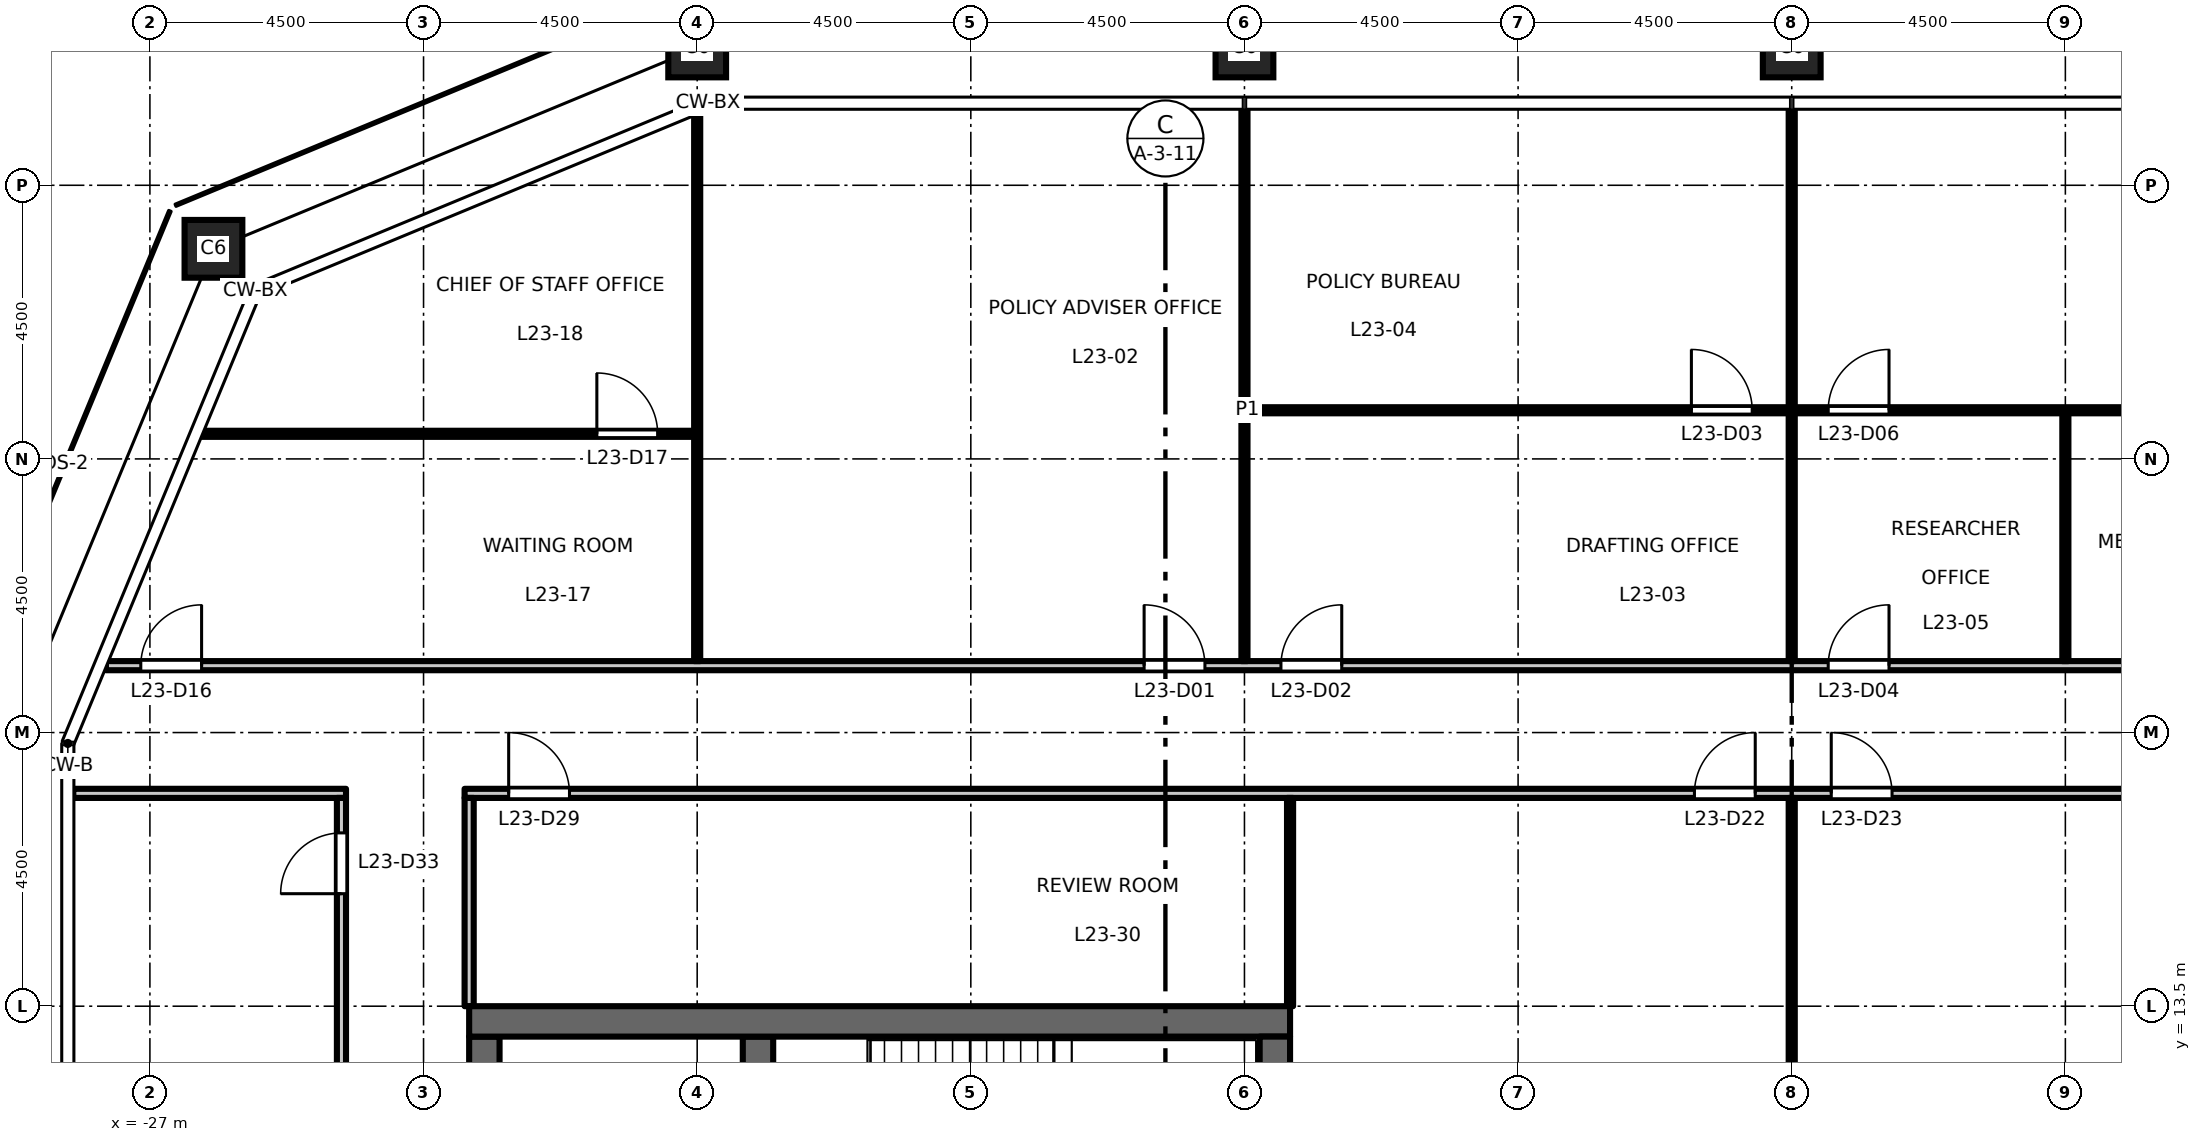
"""IFC4 building model, lengths in metres.
Left out: names, types, materials, properties, quantities, classifications, styles, units other than length and angle.
Written with IfcOpenShell. Run it as: python <this file> out.ifc"""

import sys

from ifc_helpers import new_model, si_unit, direction, frame, frame_2d, origin, origin_2d, place, context, subcontext, project, spatial, rectangle, hollow_rectangle, extrude, element, fill, save


model = new_model("IFC4")
c1 = context("Model", 3, precision=1e-05, world=origin(), true_north=direction((0.0, 1.0)))
c2 = subcontext(c1, "Body", "Model", "MODEL_VIEW")
j1 = project(units=[si_unit("LENGTHUNIT", "METRE"), si_unit("PLANEANGLEUNIT", "RADIAN")], contexts=[c1])
p1 = place(None, origin())
s1 = spatial("IfcSite", under=j1, at=p1, CompositionType="ELEMENT")
p2 = place(p1, origin())
s2 = spatial("IfcBuilding", under=s1, at=p2, CompositionType="ELEMENT")
p3 = place(p2, frame((0.0, 0.0, 109.2)))
s3 = spatial("IfcBuildingStorey", under=s2, at=p3, CompositionType="ELEMENT", Elevation=109.2)
for number, where, z_axis, x_axis in (
    (1, (0.0, 29.25, 0.0), (0.0, 0.0, 1.0), (1.0, 0.0, 0.0)),
    (2, (-9.0, 29.25, 0.0), (0.0, 0.0, 1.0), (1.0, 0.0, 0.0)),
    (3, (-18.0, 29.25, 0.0), (0.0, 0.0, 1.0), (1.0, 0.0, 0.0)),
    (4, (-25.955, 25.955, 0.0), (0.0, 0.0, 1.0), (1.0, 0.0, 0.0)),
):
    element("IfcColumn", number, at=place(p3, frame(where, z_axis=z_axis, x_axis=x_axis)), inside=s3, PredefinedType="COLUMN", context=c2, shape_type="SweptSolid", body=[
        extrude(hollow_rectangle(XDim=0.95, YDim=0.95, WallThickness=0.055, at=origin_2d()), origin(), (0.0, 0.0, 1.0), 4.5),
    ])
p4 = place(p3, frame((-21.5, -13.0, 0.0), z_axis=(0.0, 0.0, 1.0), x_axis=(0.0, 1.0, 0.0)))
e5 = element("IfcWall", 5, at=p4, inside=s3, PredefinedType="SHEAR", context=c2, shape_type="SweptSolid", body=[
    extrude(rectangle(XDim=26.0, YDim=0.5, at=frame_2d((13.0, 0.0))), origin(), (0.0, 0.0, 1.0), 4.35),
])
p5 = place(p4, frame((16.825, 0.0, 0.0)))
e6 = element("IfcOpeningElement", 6, at=p5, cuts=e5, PredefinedType="OPENING", context=c2, shape_type="SweptSolid", body=[
    extrude(rectangle(XDim=1.8, YDim=2.1, at=frame_2d((0.9, 1.05))), frame((0.0, 0.26, 0.0), z_axis=(0.0, -1.0, 0.0), x_axis=(1.0, 0.0, 0.0)), (0.0, 0.0, 1.0), 0.52),
])
p6 = place(p4, frame((7.375, 0.0, 0.0)))
e7 = element("IfcOpeningElement", 7, at=p6, cuts=e5, PredefinedType="OPENING", context=c2, shape_type="SweptSolid", body=[
    extrude(rectangle(XDim=1.8, YDim=2.1, at=frame_2d((0.9, 1.05))), frame((0.0, 0.26, 0.0), z_axis=(0.0, -1.0, 0.0), x_axis=(1.0, 0.0, 0.0)), (0.0, 0.0, 1.0), 0.52),
])
p7 = place(p4, frame((22.45, 0.0, 0.0)))
e8 = element("IfcOpeningElement", 8, at=p7, cuts=e5, PredefinedType="OPENING", context=c2, shape_type="SweptSolid", body=[
    extrude(rectangle(XDim=0.9, YDim=2.1, at=frame_2d((0.45, 1.05))), frame((0.0, 0.26, 0.0), z_axis=(0.0, -1.0, 0.0), x_axis=(1.0, 0.0, 0.0)), (0.0, 0.0, 1.0), 0.52),
])
p8 = place(p4, frame((1.7, 0.0, 0.0)))
e9 = element("IfcOpeningElement", 9, at=p8, cuts=e5, PredefinedType="OPENING", context=c2, shape_type="SweptSolid", body=[
    extrude(rectangle(XDim=0.9, YDim=2.1, at=frame_2d((0.45, 1.05))), frame((0.0, 0.26, 0.0), z_axis=(0.0, -1.0, 0.0), x_axis=(1.0, 0.0, 0.0)), (0.0, 0.0, 1.0), 0.52),
])
p9 = place(p3, frame((-17.0, 6.425, 0.0), z_axis=(0.0, 0.0, 1.0), x_axis=(0.0, 1.0, 0.0)))
e10 = element("IfcWall", 10, at=p9, inside=s3, PredefinedType="SHEAR", context=c2, shape_type="SweptSolid", body=[
    extrude(rectangle(XDim=6.575, YDim=0.5, at=frame_2d((3.288, 0.0))), origin(), (0.0, 0.0, 1.0), 4.35),
])
p10 = place(p3, frame((-8.25, 13.25, 0.0), z_axis=(0.0, 0.0, 1.0), x_axis=(-1.0, 0.0, 0.0)))
e11 = element("IfcWall", 11, at=p10, inside=s3, PredefinedType="SHEAR", context=c2, shape_type="SweptSolid", body=[
    extrude(rectangle(XDim=13.5, YDim=0.5, at=frame_2d((6.75, 0.0))), origin(), (0.0, 0.0, 1.0), 4.35),
])
p11 = place(p3, frame((-8.5, -13.0, 0.0), z_axis=(0.0, 0.0, 1.0), x_axis=(0.0, 1.0, 0.0)))
e12 = element("IfcWall", 12, at=p11, inside=s3, PredefinedType="SHEAR", context=c2, shape_type="SweptSolid", body=[
    extrude(rectangle(XDim=26.0, YDim=0.5, at=frame_2d((13.0, 0.0))), origin(), (0.0, 0.0, 1.0), 4.35),
])
p12 = place(p3, frame((-28.26, 17.0, 0.0), z_axis=(0.0, 0.0, 1.0), x_axis=(1.0, 0.0, 0.0)))
e13 = element("IfcWall", 13, at=p12, inside=s3, PredefinedType="PARTITIONING", context=c2, shape_type="SweptSolid", body=[
    extrude(rectangle(XDim=4.485, YDim=0.15, at=frame_2d((2.243, 0.0))), origin(), (0.0, 0.0, 1.0), 4.35),
])
p13 = place(p3, frame((-21.825, 17.0, 0.0), z_axis=(0.0, 0.0, 1.0), x_axis=(1.0, 0.0, 0.0)))
e14 = element("IfcWall", 14, at=p13, inside=s3, PredefinedType="PARTITIONING", context=c2, shape_type="SweptSolid", body=[
    extrude(rectangle(XDim=43.65, YDim=0.15, at=frame_2d((21.825, 0.0))), origin(), (0.0, 0.0, 1.0), 4.35),
])
p14 = place(p13, frame((20.225, 0.0, 0.0)))
e15 = element("IfcOpeningElement", 15, at=p14, cuts=e14, PredefinedType="OPENING", context=c2, shape_type="SweptSolid", body=[
    extrude(rectangle(XDim=1.0, YDim=2.1, at=frame_2d((0.5, 1.05))), frame((0.0, 0.085, 0.0), z_axis=(0.0, -1.0, 0.0), x_axis=(1.0, 0.0, 0.0)), (0.0, 0.0, 1.0), 0.17),
])
p15 = place(p13, frame((22.475, 0.0, 0.0)))
e16 = element("IfcOpeningElement", 16, at=p15, cuts=e14, PredefinedType="OPENING", context=c2, shape_type="SweptSolid", body=[
    extrude(rectangle(XDim=1.0, YDim=2.1, at=frame_2d((0.5, 1.05))), frame((0.0, 0.085, 0.0), z_axis=(0.0, -1.0, 0.0), x_axis=(1.0, 0.0, 0.0)), (0.0, 0.0, 1.0), 0.17),
])
p16 = place(p13, frame((0.725, 0.0, 0.0)))
e17 = element("IfcOpeningElement", 17, at=p16, cuts=e14, PredefinedType="OPENING", context=c2, shape_type="SweptSolid", body=[
    extrude(rectangle(XDim=1.0, YDim=2.1, at=frame_2d((0.5, 1.05))), frame((0.0, 0.085, 0.0), z_axis=(0.0, -1.0, 0.0), x_axis=(1.0, 0.0, 0.0)), (0.0, 0.0, 1.0), 0.17),
])
p17 = place(p13, frame((41.975, 0.0, 0.0)))
e18 = element("IfcOpeningElement", 18, at=p17, cuts=e14, PredefinedType="OPENING", context=c2, shape_type="SweptSolid", body=[
    extrude(rectangle(XDim=1.0, YDim=2.1, at=frame_2d((0.5, 1.05))), frame((0.0, 0.085, 0.0), z_axis=(0.0, -1.0, 0.0), x_axis=(1.0, 0.0, 0.0)), (0.0, 0.0, 1.0), 0.17),
])
p18 = place(p3, frame((-27.723, 19.1, 0.0), z_axis=(0.0, 0.0, 1.0), x_axis=(1.0, 0.0, 0.0)))
e19 = element("IfcWall", 19, at=p18, inside=s3, PredefinedType="PARTITIONING", context=c2, shape_type="SweptSolid", body=[
    extrude(rectangle(XDim=55.446, YDim=0.15, at=frame_2d((27.723, 0.0))), origin(), (0.0, 0.0, 1.0), 4.35),
])
p19 = place(p18, frame((17.073, 0.0, 0.0)))
e20 = element("IfcOpeningElement", 20, at=p19, cuts=e19, PredefinedType="OPENING", context=c2, shape_type="SweptSolid", body=[
    extrude(rectangle(XDim=1.0, YDim=2.1, at=frame_2d((0.5, 1.05))), frame((0.0, 0.085, 0.0), z_axis=(0.0, -1.0, 0.0), x_axis=(1.0, 0.0, 0.0)), (0.0, 0.0, 1.0), 0.17),
])
p20 = place(p18, frame((19.323, 0.0, 0.0)))
e21 = element("IfcOpeningElement", 21, at=p20, cuts=e19, PredefinedType="OPENING", context=c2, shape_type="SweptSolid", body=[
    extrude(rectangle(XDim=1.0, YDim=2.1, at=frame_2d((0.5, 1.05))), frame((0.0, 0.085, 0.0), z_axis=(0.0, -1.0, 0.0), x_axis=(1.0, 0.0, 0.0)), (0.0, 0.0, 1.0), 0.17),
])
p21 = place(p18, frame((28.323, 0.0, 0.0)))
e22 = element("IfcOpeningElement", 22, at=p21, cuts=e19, PredefinedType="OPENING", context=c2, shape_type="SweptSolid", body=[
    extrude(rectangle(XDim=1.0, YDim=2.1, at=frame_2d((0.5, 1.05))), frame((0.0, 0.085, 0.0), z_axis=(0.0, -1.0, 0.0), x_axis=(1.0, 0.0, 0.0)), (0.0, 0.0, 1.0), 0.17),
])
p22 = place(p18, frame((35.073, 0.0, 0.0)))
e23 = element("IfcOpeningElement", 23, at=p22, cuts=e19, PredefinedType="OPENING", context=c2, shape_type="SweptSolid", body=[
    extrude(rectangle(XDim=1.0, YDim=2.1, at=frame_2d((0.5, 1.05))), frame((0.0, 0.085, 0.0), z_axis=(0.0, -1.0, 0.0), x_axis=(1.0, 0.0, 0.0)), (0.0, 0.0, 1.0), 0.17),
])
p23 = place(p18, frame((44.073, 0.0, 0.0)))
e24 = element("IfcOpeningElement", 24, at=p23, cuts=e19, PredefinedType="OPENING", context=c2, shape_type="SweptSolid", body=[
    extrude(rectangle(XDim=1.0, YDim=2.1, at=frame_2d((0.5, 1.05))), frame((0.0, 0.085, 0.0), z_axis=(0.0, -1.0, 0.0), x_axis=(1.0, 0.0, 0.0)), (0.0, 0.0, 1.0), 0.17),
])
p24 = place(p18, frame((0.573, 0.0, 0.0)))
e25 = element("IfcOpeningElement", 25, at=p24, cuts=e19, PredefinedType="OPENING", context=c2, shape_type="SweptSolid", body=[
    extrude(rectangle(XDim=1.0, YDim=2.1, at=frame_2d((0.5, 1.05))), frame((0.0, 0.085, 0.0), z_axis=(0.0, -1.0, 0.0), x_axis=(1.0, 0.0, 0.0)), (0.0, 0.0, 1.0), 0.17),
])
p25 = place(p18, frame((46.296, 0.0, 0.0)))
e26 = element("IfcOpeningElement", 26, at=p25, cuts=e19, PredefinedType="OPENING", context=c2, shape_type="SweptSolid", body=[
    extrude(rectangle(XDim=1.0, YDim=2.1, at=frame_2d((0.5, 1.05))), frame((0.0, 0.085, 0.0), z_axis=(0.0, -1.0, 0.0), x_axis=(1.0, 0.0, 0.0)), (0.0, 0.0, 1.0), 0.17),
])
p26 = place(p3, frame((-26.143, 22.913, 0.0), z_axis=(0.0, 0.0, 1.0), x_axis=(1.0, 0.0, 0.0)))
e27 = element("IfcWall", 27, at=p26, inside=s3, PredefinedType="PARTITIONING", context=c2, shape_type="SweptSolid", body=[
    extrude(rectangle(XDim=8.093, YDim=0.1, at=frame_2d((4.046, 0.0))), origin(), (0.0, 0.0, 1.0), 4.35),
])
p27 = place(p26, frame((6.493, 0.0, 0.0)))
e28 = element("IfcOpeningElement", 28, at=p27, cuts=e27, PredefinedType="OPENING", context=c2, shape_type="SweptSolid", body=[
    extrude(rectangle(XDim=1.0, YDim=2.1, at=frame_2d((0.5, 1.05))), frame((0.0, 0.06, 0.0), z_axis=(0.0, -1.0, 0.0), x_axis=(1.0, 0.0, 0.0)), (0.0, 0.0, 1.0), 0.12),
])
p28 = place(p3, frame((-8.95, 23.3, 0.0), z_axis=(0.0, 0.0, 1.0), x_axis=(1.0, 0.0, 0.0)))
e29 = element("IfcWall", 29, at=p28, inside=s3, PredefinedType="PARTITIONING", context=c2, shape_type="SweptSolid", body=[
    extrude(rectangle(XDim=17.9, YDim=0.1, at=frame_2d((8.95, 0.0))), origin(), (0.0, 0.0, 1.0), 4.35),
])
p29 = place(p28, frame((7.3, 0.0, 0.0)))
e30 = element("IfcOpeningElement", 30, at=p29, cuts=e29, PredefinedType="OPENING", context=c2, shape_type="SweptSolid", body=[
    extrude(rectangle(XDim=1.0, YDim=2.1, at=frame_2d((0.5, 1.05))), frame((0.0, 0.06, 0.0), z_axis=(0.0, -1.0, 0.0), x_axis=(1.0, 0.0, 0.0)), (0.0, 0.0, 1.0), 0.12),
])
p30 = place(p28, frame((9.55, 0.0, 0.0)))
e31 = element("IfcOpeningElement", 31, at=p30, cuts=e29, PredefinedType="OPENING", context=c2, shape_type="SweptSolid", body=[
    extrude(rectangle(XDim=1.0, YDim=2.1, at=frame_2d((0.5, 1.05))), frame((0.0, 0.06, 0.0), z_axis=(0.0, -1.0, 0.0), x_axis=(1.0, 0.0, 0.0)), (0.0, 0.0, 1.0), 0.12),
])
p31 = place(p3, frame((-23.85, -16.925, 0.0), z_axis=(0.0, 0.0, 1.0), x_axis=(0.0, 1.0, 0.0)))
e32 = element("IfcWall", 32, at=p31, inside=s3, PredefinedType="PARTITIONING", context=c2, shape_type="SweptSolid", body=[
    extrude(rectangle(XDim=33.85, YDim=0.15, at=frame_2d((16.925, 0.0))), origin(), (0.0, 0.0, 1.0), 4.35),
])
p32 = place(p31, frame((32.275, 0.0, 0.0)))
e33 = element("IfcOpeningElement", 33, at=p32, cuts=e32, PredefinedType="OPENING", context=c2, shape_type="SweptSolid", body=[
    extrude(rectangle(XDim=1.0, YDim=2.1, at=frame_2d((0.5, 1.05))), frame((0.0, 0.085, 0.0), z_axis=(0.0, -1.0, 0.0), x_axis=(1.0, 0.0, 0.0)), (0.0, 0.0, 1.0), 0.17),
])
p33 = place(p3, frame((-21.75, 13.5, 0.0), z_axis=(0.0, 0.0, 1.0), x_axis=(0.0, 1.0, 0.0)))
e34 = element("IfcWall", 34, at=p33, inside=s3, PredefinedType="PARTITIONING", context=c2, shape_type="SweptSolid", body=[
    extrude(rectangle(XDim=3.425, YDim=0.15, at=frame_2d((1.712, 0.0))), origin(), (0.0, 0.0, 1.0), 4.35),
])
p34 = place(p3, frame((-18.0, 19.175, 0.0), z_axis=(0.0, 0.0, 1.0), x_axis=(0.0, 1.0, 0.0)))
e35 = element("IfcWall", 35, at=p34, inside=s3, PredefinedType="PARTITIONING", context=c2, shape_type="SweptSolid", body=[
    extrude(rectangle(XDim=9.003, YDim=0.1, at=frame_2d((4.501, 0.0))), origin(), (0.0, 0.0, 1.0), 3.45),
])
p35 = place(p3, frame((-9.0, 19.175, 0.0), z_axis=(0.0, 0.0, 1.0), x_axis=(0.0, 1.0, 0.0)))
e36 = element("IfcWall", 36, at=p35, inside=s3, PredefinedType="PARTITIONING", context=c2, shape_type="SweptSolid", body=[
    extrude(rectangle(XDim=9.085, YDim=0.1, at=frame_2d((4.542, 0.0))), origin(), (0.0, 0.0, 1.0), 3.45),
])
p36 = place(p3, frame((-8.25, 13.5, 0.0), z_axis=(0.0, 0.0, 1.0), x_axis=(0.0, 1.0, 0.0)))
e37 = element("IfcWall", 37, at=p36, inside=s3, PredefinedType="PARTITIONING", context=c2, shape_type="SweptSolid", body=[
    extrude(rectangle(XDim=3.425, YDim=0.1, at=frame_2d((1.712, 0.0))), origin(), (0.0, 0.0, 1.0), 4.35),
])
p37 = place(p3, frame((0.0, 8.65, 0.0), z_axis=(0.0, 0.0, 1.0), x_axis=(0.0, 1.0, 0.0)))
e38 = element("IfcWall", 38, at=p37, inside=s3, PredefinedType="PARTITIONING", context=c2, shape_type="SweptSolid", body=[
    extrude(rectangle(XDim=8.275, YDim=0.1, at=frame_2d((4.138, 0.0))), origin(), (0.0, 0.0, 1.0), 3.45),
])
p38 = place(p3, frame((0.0, 19.175, 0.0), z_axis=(0.0, 0.0, 1.0), x_axis=(0.0, 1.0, 0.0)))
e39 = element("IfcWall", 39, at=p38, inside=s3, PredefinedType="PARTITIONING", context=c2, shape_type="SweptSolid", body=[
    extrude(rectangle(XDim=4.075, YDim=0.1, at=frame_2d((2.038, 0.0))), origin(), (0.0, 0.0, 1.0), 3.45),
])
p39 = place(p3, frame((0.0, 23.35, 0.0), z_axis=(0.0, 0.0, 1.0), x_axis=(0.0, 1.0, 0.0)))
e40 = element("IfcWall", 40, at=p39, inside=s3, PredefinedType="PARTITIONING", context=c2, shape_type="SweptSolid", body=[
    extrude(rectangle(XDim=4.91, YDim=0.1, at=frame_2d((2.455, 0.0))), origin(), (0.0, 0.0, 1.0), 3.45),
])
p40 = place(p3, frame((4.5, 19.175, 0.0), z_axis=(0.0, 0.0, 1.0), x_axis=(0.0, 1.0, 0.0)))
e41 = element("IfcWall", 41, at=p40, inside=s3, PredefinedType="PARTITIONING", context=c2, shape_type="SweptSolid", body=[
    extrude(rectangle(XDim=4.075, YDim=0.1, at=frame_2d((2.038, 0.0))), origin(), (0.0, 0.0, 1.0), 4.35),
])
p41 = place(p19, origin())
e42 = element("IfcDoor", 42, at=p41, inside=s3, OperationType="SINGLE_SWING_LEFT", PredefinedType="DOOR", context=c2, shape_type="SweptSolid", body=[
    extrude(rectangle(XDim=1.0, YDim=2.1, at=frame_2d((0.5, 1.05))), frame((0.0, 0.025, 0.0), z_axis=(0.0, -1.0, 0.0), x_axis=(1.0, 0.0, 0.0)), (0.0, 0.0, 1.0), 0.05),
])
fill(e20, e42)
p42 = place(p20, origin())
e43 = element("IfcDoor", 43, at=p42, inside=s3, OperationType="SINGLE_SWING_RIGHT", PredefinedType="DOOR", context=c2, shape_type="SweptSolid", body=[
    extrude(rectangle(XDim=1.0, YDim=2.1, at=frame_2d((0.5, 1.05))), frame((0.0, 0.025, 0.0), z_axis=(0.0, -1.0, 0.0), x_axis=(1.0, 0.0, 0.0)), (0.0, 0.0, 1.0), 0.05),
])
fill(e21, e43)
p43 = place(p29, origin())
e44 = element("IfcDoor", 44, at=p43, inside=s3, OperationType="SINGLE_SWING_LEFT", PredefinedType="DOOR", context=c2, shape_type="SweptSolid", body=[
    extrude(rectangle(XDim=1.0, YDim=2.1, at=frame_2d((0.5, 1.05))), frame((0.0, 0.025, 0.0), z_axis=(0.0, -1.0, 0.0), x_axis=(1.0, 0.0, 0.0)), (0.0, 0.0, 1.0), 0.05),
])
fill(e30, e44)
p44 = place(p21, origin())
e45 = element("IfcDoor", 45, at=p44, inside=s3, OperationType="SINGLE_SWING_RIGHT", PredefinedType="DOOR", context=c2, shape_type="SweptSolid", body=[
    extrude(rectangle(XDim=1.0, YDim=2.1, at=frame_2d((0.5, 1.05))), frame((0.0, 0.025, 0.0), z_axis=(0.0, -1.0, 0.0), x_axis=(1.0, 0.0, 0.0)), (0.0, 0.0, 1.0), 0.05),
])
fill(e22, e45)
p45 = place(p30, origin())
e46 = element("IfcDoor", 46, at=p45, inside=s3, OperationType="SINGLE_SWING_RIGHT", PredefinedType="DOOR", context=c2, shape_type="SweptSolid", body=[
    extrude(rectangle(XDim=1.0, YDim=2.1, at=frame_2d((0.5, 1.05))), frame((0.0, 0.025, 0.0), z_axis=(0.0, -1.0, 0.0), x_axis=(1.0, 0.0, 0.0)), (0.0, 0.0, 1.0), 0.05),
])
fill(e31, e46)
p46 = place(p24, origin())
e47 = element("IfcDoor", 47, at=p46, inside=s3, OperationType="SINGLE_SWING_RIGHT", PredefinedType="DOOR", context=c2, shape_type="SweptSolid", body=[
    extrude(rectangle(XDim=1.0, YDim=2.1, at=frame_2d((0.5, 1.05))), frame((0.0, 0.025, 0.0), z_axis=(0.0, -1.0, 0.0), x_axis=(1.0, 0.0, 0.0)), (0.0, 0.0, 1.0), 0.05),
])
fill(e25, e47)
p47 = place(p27, origin())
e48 = element("IfcDoor", 48, at=p47, inside=s3, OperationType="SINGLE_SWING_LEFT", PredefinedType="DOOR", context=c2, shape_type="SweptSolid", body=[
    extrude(rectangle(XDim=1.0, YDim=2.1, at=frame_2d((0.5, 1.05))), frame((0.0, 0.025, 0.0), z_axis=(0.0, -1.0, 0.0), x_axis=(1.0, 0.0, 0.0)), (0.0, 0.0, 1.0), 0.05),
])
fill(e28, e48)
p48 = place(p14, origin())
e49 = element("IfcDoor", 49, at=p48, inside=s3, OperationType="SINGLE_SWING_RIGHT", PredefinedType="DOOR", context=c2, shape_type="SweptSolid", body=[
    extrude(rectangle(XDim=1.0, YDim=2.1, at=frame_2d((0.5, 1.05))), frame((0.0, 0.025, 0.0), z_axis=(0.0, -1.0, 0.0), x_axis=(1.0, 0.0, 0.0)), (0.0, 0.0, 1.0), 0.05),
])
fill(e15, e49)
p49 = place(p15, origin())
e50 = element("IfcDoor", 50, at=p49, inside=s3, OperationType="SINGLE_SWING_LEFT", PredefinedType="DOOR", context=c2, shape_type="SweptSolid", body=[
    extrude(rectangle(XDim=1.0, YDim=2.1, at=frame_2d((0.5, 1.05))), frame((0.0, 0.025, 0.0), z_axis=(0.0, -1.0, 0.0), x_axis=(1.0, 0.0, 0.0)), (0.0, 0.0, 1.0), 0.05),
])
fill(e16, e50)
p50 = place(p16, origin())
e51 = element("IfcDoor", 51, at=p50, inside=s3, OperationType="SINGLE_SWING_LEFT", PredefinedType="DOOR", context=c2, shape_type="SweptSolid", body=[
    extrude(rectangle(XDim=1.0, YDim=2.1, at=frame_2d((0.5, 1.05))), frame((0.0, 0.025, 0.0), z_axis=(0.0, -1.0, 0.0), x_axis=(1.0, 0.0, 0.0)), (0.0, 0.0, 1.0), 0.05),
])
fill(e17, e51)
p51 = place(p32, origin())
e52 = element("IfcDoor", 52, at=p51, inside=s3, OperationType="SINGLE_SWING_LEFT", PredefinedType="DOOR", context=c2, shape_type="SweptSolid", body=[
    extrude(rectangle(XDim=1.0, YDim=2.1, at=frame_2d((0.5, 1.05))), frame((0.0, 0.025, 0.0), z_axis=(0.0, -1.0, 0.0), x_axis=(1.0, 0.0, 0.0)), (0.0, 0.0, 1.0), 0.05),
])
fill(e33, e52)
save(model, sys.argv[1])
